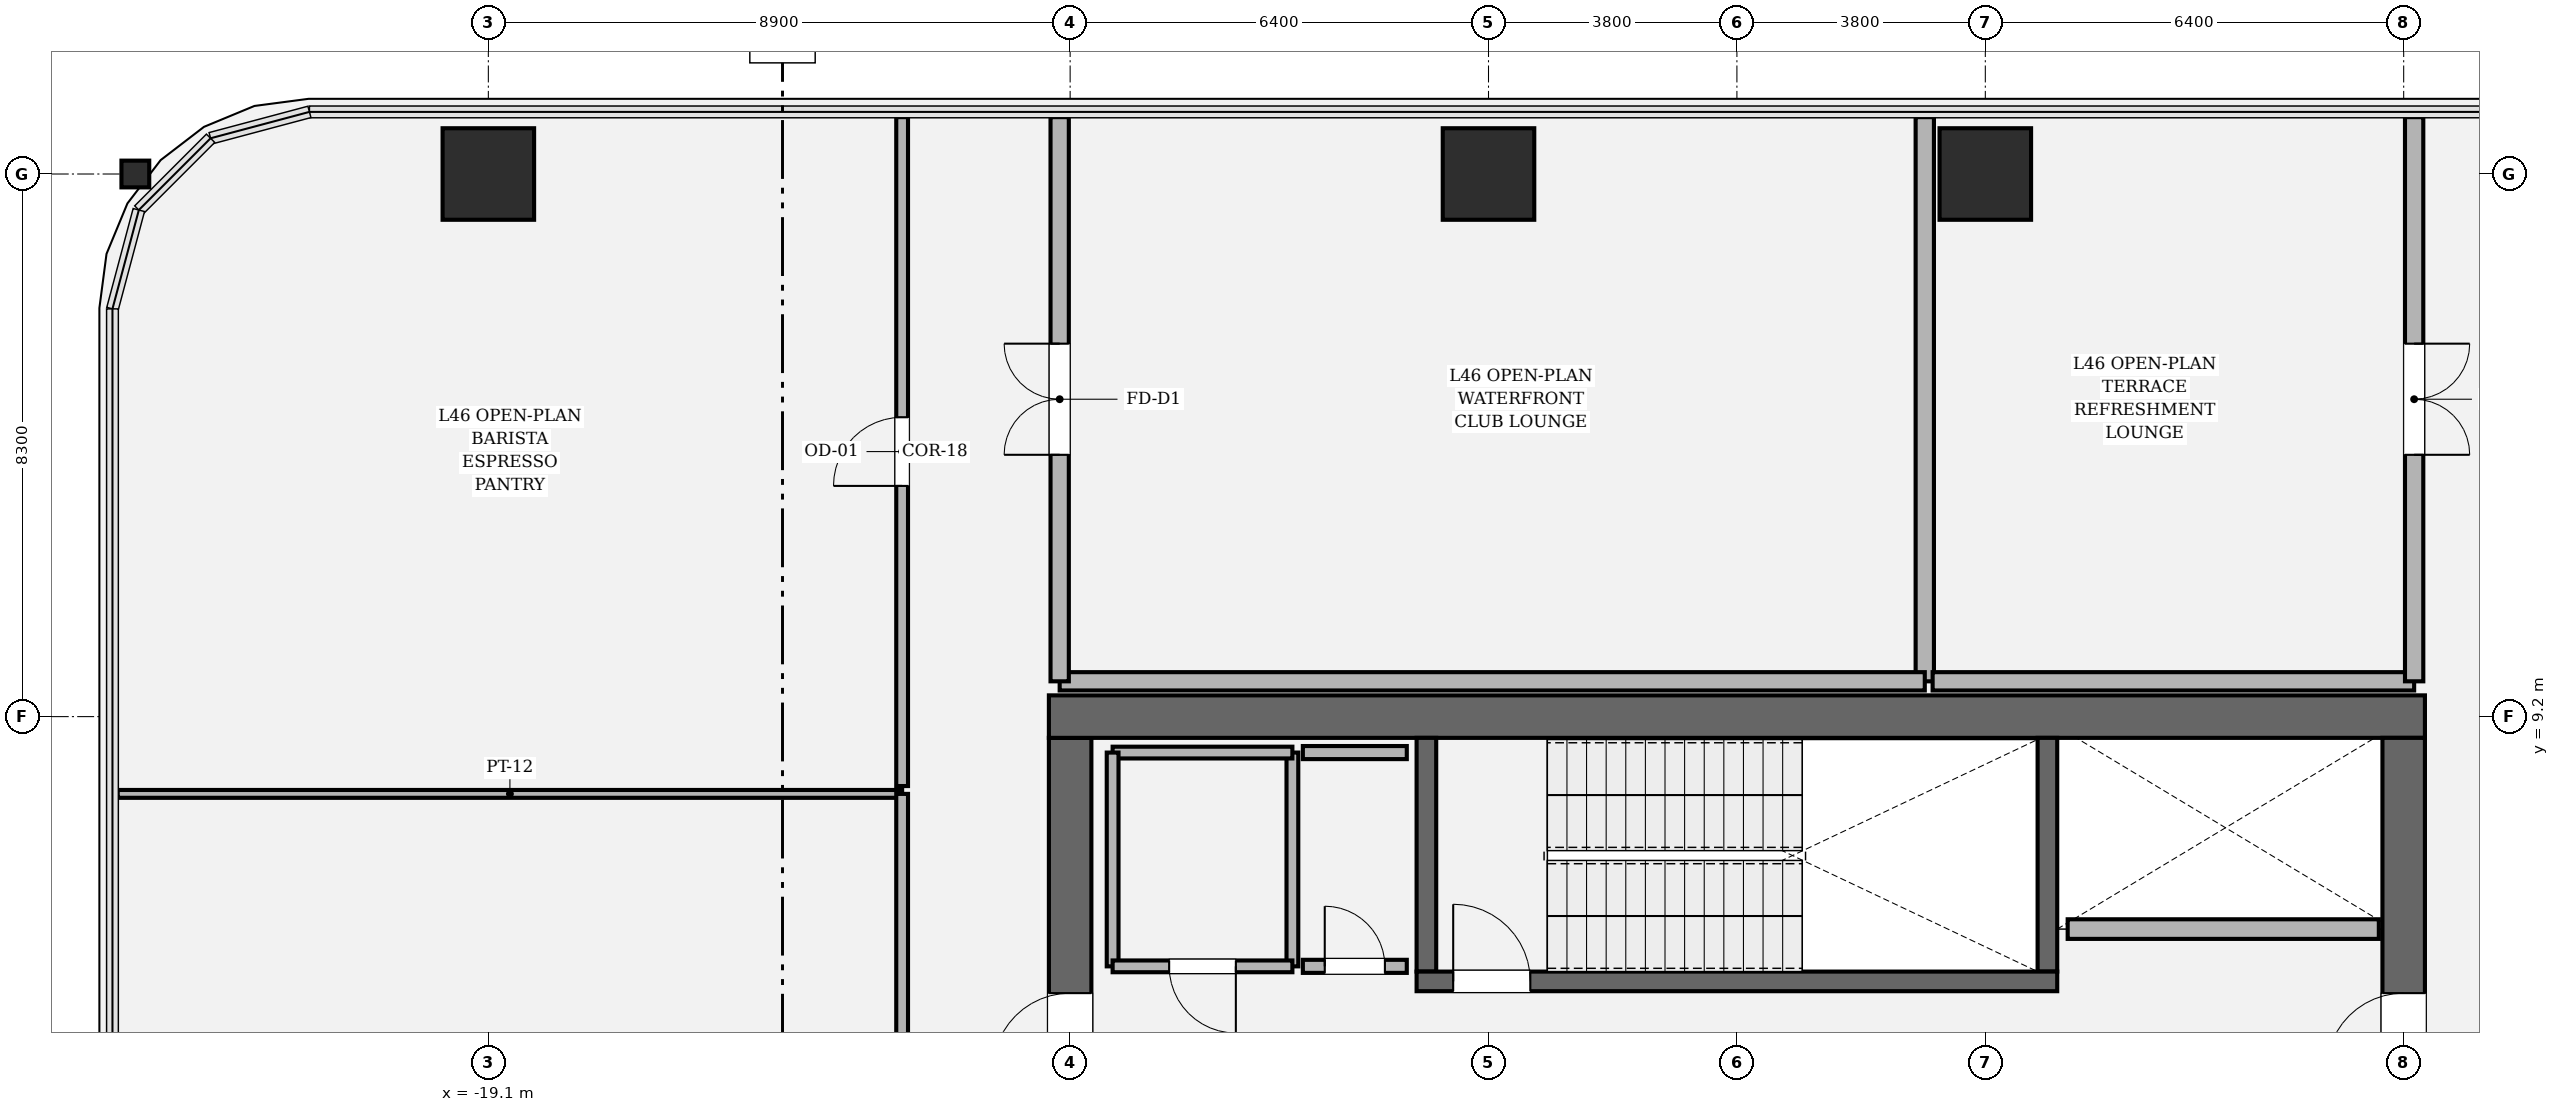
"""IFC4 building model, lengths in metres.
Left out: names, types, materials, properties, quantities, classifications, styles, units other than length and angle.
Written with IfcOpenShell. Run it as: python <this file> out.ifc"""

import sys

from ifc_helpers import new_model, si_unit, direction, frame, frame_2d, origin, origin_2d, place, context, subcontext, project, spatial, rectangle, hollow_rectangle, i_section, extrude, element, fill, save


model = new_model("IFC4")
c1 = context("Model", 3, precision=1e-05, world=origin(), true_north=direction((0.0, 1.0)))
c2 = subcontext(c1, "Body", "Model", "MODEL_VIEW")
j1 = project(units=[si_unit("LENGTHUNIT", "METRE"), si_unit("PLANEANGLEUNIT", "RADIAN")], contexts=[c1])
p1 = place(None, origin())
s1 = spatial("IfcSite", under=j1, at=p1, CompositionType="ELEMENT")
p2 = place(p1, origin())
s2 = spatial("IfcBuilding", under=s1, at=p2, CompositionType="ELEMENT")
p3 = place(p2, frame((0.0, 0.0, 196.5)))
s3 = spatial("IfcBuildingStorey", under=s2, at=p3, CompositionType="ELEMENT", Elevation=196.5)
p4 = place(p3, frame((-10.2, -8.875, 0.0), z_axis=(0.0, 0.0, 1.0), x_axis=(0.0, 1.0, 0.0)))
e1 = element("IfcWall", 1, at=p4, inside=s3, PredefinedType="SHEAR", context=c2, shape_type="SweptSolid", body=[
    extrude(rectangle(XDim=17.75, YDim=0.65, at=frame_2d((8.875, 0.0))), origin(), (0.0, 0.0, 1.0), 4.05),
])
p5 = place(p4, frame((12.665, 0.0, 0.0)))
e2 = element("IfcOpeningElement", 2, at=p5, cuts=e1, PredefinedType="OPENING", context=c2, shape_type="SweptSolid", body=[
    extrude(rectangle(XDim=1.18, YDim=2.2, at=frame_2d((0.59, 1.1))), frame((0.0, 0.335, 0.0), z_axis=(0.0, -1.0, 0.0), x_axis=(1.0, 0.0, 0.0)), (0.0, 0.0, 1.0), 0.67),
])
p6 = place(p3, frame((-10.525, 9.2, 0.0), z_axis=(0.0, 0.0, 1.0), x_axis=(1.0, 0.0, 0.0)))
e3 = element("IfcWall", 3, at=p6, inside=s3, PredefinedType="SHEAR", context=c2, shape_type="SweptSolid", body=[
    extrude(rectangle(XDim=21.05, YDim=0.65, at=frame_2d((10.525, 0.0))), origin(), (0.0, 0.0, 1.0), 4.05),
])
p7 = place(p3, frame((10.2, 8.875, 0.0), z_axis=(0.0, 0.0, 1.0), x_axis=(0.0, -1.0, 0.0)))
e4 = element("IfcWall", 4, at=p7, inside=s3, PredefinedType="SHEAR", context=c2, shape_type="SweptSolid", body=[
    extrude(rectangle(XDim=17.75, YDim=0.65, at=frame_2d((8.875, 0.0))), origin(), (0.0, 0.0, 1.0), 4.05),
])
p8 = place(p7, frame((3.905, 0.0, 0.0)))
e5 = element("IfcOpeningElement", 5, at=p8, cuts=e4, PredefinedType="OPENING", context=c2, shape_type="SweptSolid", body=[
    extrude(rectangle(XDim=1.18, YDim=2.2, at=frame_2d((0.59, 1.1))), frame((0.0, 0.335, 0.0), z_axis=(0.0, -1.0, 0.0), x_axis=(1.0, 0.0, 0.0)), (0.0, 0.0, 1.0), 0.67),
])
for number, where, z_axis, x_axis in (
    (6, (-4.75, 5.3, 0.0), (0.0, 0.0, 1.0), (0.0, 1.0, 0.0)),
    (7, (4.75, 8.875, 0.0), (0.0, 0.0, 1.0), (0.0, -1.0, 0.0)),
):
    element("IfcWall", number, at=place(p3, frame(where, z_axis=z_axis, x_axis=x_axis)), inside=s3, PredefinedType="SOLIDWALL", context=c2, shape_type="SweptSolid", body=[
        extrude(rectangle(XDim=3.575, YDim=0.3, at=frame_2d((1.788, 0.0))), origin(), (0.0, 0.0, 1.0), 4.05),
    ])
p9 = place(p3, frame((-4.9, 5.15, 0.0), z_axis=(0.0, 0.0, 1.0), x_axis=(1.0, 0.0, 0.0)))
e8 = element("IfcWall", 8, at=p9, inside=s3, PredefinedType="SOLIDWALL", context=c2, shape_type="SweptSolid", body=[
    extrude(rectangle(XDim=9.8, YDim=0.3, at=frame_2d((4.9, 0.0))), origin(), (0.0, 0.0, 1.0), 4.05),
])
p10 = place(p9, frame((0.56, 0.0, 0.0)))
e9 = element("IfcOpeningElement", 9, at=p10, cuts=e8, PredefinedType="OPENING", context=c2, shape_type="SweptSolid", body=[
    extrude(rectangle(XDim=1.18, YDim=2.2, at=frame_2d((0.59, 1.1))), frame((0.0, 0.16, 0.0), z_axis=(0.0, -1.0, 0.0), x_axis=(1.0, 0.0, 0.0)), (0.0, 0.0, 1.0), 0.32),
])
for number, where, z_axis, x_axis in (
    (10, (3.8, 17.5, 0.0), (0.0, 0.0, 1.0), (1.0, 0.0, 0.0)),
    (11, (-3.8, 17.5, 0.0), (0.0, 0.0, 1.0), (1.0, 0.0, 0.0)),
    (12, (-19.1, 17.5, 0.0), (0.0, 0.0, 1.0), (1.0, 0.0, 0.0)),
):
    element("IfcColumn", number, at=place(p3, frame(where, z_axis=z_axis, x_axis=x_axis)), inside=s3, PredefinedType="COLUMN", context=c2, shape_type="SweptSolid", body=[
        extrude(hollow_rectangle(XDim=1.4, YDim=1.4, WallThickness=0.042, at=origin_2d()), origin(), (0.0, 0.0, 1.0), 4.05),
    ])
p11 = place(p3, frame((-24.5, 17.5, 0.0), z_axis=(0.0, 0.0, 1.0), x_axis=(0.0, 1.0, 0.0)))
e13 = element("IfcColumn", 13, at=p11, inside=s3, PredefinedType="COLUMN", context=c2, shape_type="SweptSolid", body=[
    extrude(i_section(OverallWidth=0.409, OverallDepth=0.425, WebThickness=0.032, FlangeThickness=0.052, FilletRadius=0.018, at=origin_2d()), origin(), (0.0, 0.0, 1.0), 4.048),
])
p12 = place(p3, frame((5.06, 5.95, 0.0), z_axis=(0.0, 0.0, 1.0), x_axis=(1.0, 0.0, 0.0)))
e14 = element("IfcWall", 14, at=p12, inside=s3, PredefinedType="SOLIDWALL", context=c2, shape_type="SweptSolid", body=[
    extrude(rectangle(XDim=4.76, YDim=0.3, at=frame_2d((2.38, 0.0))), origin(), (0.0, 0.0, 1.0), 3.83),
])
p13 = place(p3, frame((-6.8, 5.38, 0.0), z_axis=(0.0, 0.0, 1.0), x_axis=(0.0, 1.0, 0.0)))
e15 = element("IfcWall", 15, at=p13, inside=s3, PredefinedType="PARTITIONING", context=c2, shape_type="SweptSolid", body=[
    extrude(rectangle(XDim=3.27, YDim=0.18, at=frame_2d((1.635, 0.0))), origin(), (0.0, 0.0, 1.0), 3.83),
])
p14 = place(p3, frame((-6.8, 8.65, 0.0), z_axis=(0.0, 0.0, 1.0), x_axis=(-1.0, 0.0, 0.0)))
e16 = element("IfcWall", 16, at=p14, inside=s3, PredefinedType="PARTITIONING", context=c2, shape_type="SweptSolid", body=[
    extrude(rectangle(XDim=2.75, YDim=0.18, at=frame_2d((1.375, 0.0))), origin(), (0.0, 0.0, 1.0), 3.83),
])
p15 = place(p3, frame((-9.55, 8.65, 0.0), z_axis=(0.0, 0.0, 1.0), x_axis=(0.0, -1.0, 0.0)))
e17 = element("IfcWall", 17, at=p15, inside=s3, PredefinedType="PARTITIONING", context=c2, shape_type="SweptSolid", body=[
    extrude(rectangle(XDim=3.27, YDim=0.18, at=frame_2d((1.635, 0.0))), origin(), (0.0, 0.0, 1.0), 3.83),
])
p16 = place(p3, frame((-9.55, 5.38, 0.0), z_axis=(0.0, 0.0, 1.0), x_axis=(1.0, 0.0, 0.0)))
e18 = element("IfcWall", 18, at=p16, inside=s3, PredefinedType="PARTITIONING", context=c2, shape_type="SweptSolid", body=[
    extrude(rectangle(XDim=2.75, YDim=0.18, at=frame_2d((1.375, 0.0))), origin(), (0.0, 0.0, 1.0), 3.83),
])
p17 = place(p16, frame((0.865, 0.0, 0.0)))
e19 = element("IfcOpeningElement", 19, at=p17, cuts=e18, PredefinedType="OPENING", context=c2, shape_type="SweptSolid", body=[
    extrude(rectangle(XDim=1.02, YDim=2.2, at=frame_2d((0.51, 1.1))), frame((0.0, 0.1, 0.0), z_axis=(0.0, -1.0, 0.0), x_axis=(1.0, 0.0, 0.0)), (0.0, 0.0, 1.0), 0.2),
])
p18 = place(p3, frame((-5.05, 8.65, 0.0), z_axis=(0.0, 0.0, 1.0), x_axis=(-1.0, 0.0, 0.0)))
e20 = element("IfcWall", 20, at=p18, inside=s3, PredefinedType="SOLIDWALL", context=c2, shape_type="SweptSolid", body=[
    extrude(rectangle(XDim=1.59, YDim=0.2, at=frame_2d((0.795, 0.0))), origin(), (0.0, 0.0, 1.0), 3.83),
])
p19 = place(p3, frame((-6.64, 5.38, 0.0), z_axis=(0.0, 0.0, 1.0), x_axis=(1.0, 0.0, 0.0)))
e21 = element("IfcWall", 21, at=p19, inside=s3, PredefinedType="SOLIDWALL", context=c2, shape_type="SweptSolid", body=[
    extrude(rectangle(XDim=1.59, YDim=0.2, at=frame_2d((0.795, 0.0))), origin(), (0.0, 0.0, 1.0), 3.83),
])
p20 = place(p19, frame((0.335, 0.0, 0.0)))
e22 = element("IfcOpeningElement", 22, at=p20, cuts=e21, PredefinedType="OPENING", context=c2, shape_type="SweptSolid", body=[
    extrude(rectangle(XDim=0.92, YDim=2.1, at=frame_2d((0.46, 1.05))), frame((0.0, 0.11, 0.0), z_axis=(0.0, -1.0, 0.0), x_axis=(1.0, 0.0, 0.0)), (0.0, 0.0, 1.0), 0.22),
])
p21 = place(p3, frame((-24.77, 8.018, 0.0), z_axis=(0.0, 0.0, 1.0), x_axis=(1.0, 0.0, 0.0)))
e23 = element("IfcWall", 23, at=p21, inside=s3, PredefinedType="PARTITIONING", context=c2, shape_type="SweptSolid", body=[
    extrude(rectangle(XDim=12.0, YDim=0.12, at=frame_2d((6.0, 0.0))), origin(), (0.0, 0.0, 1.0), 2.544),
])
p22 = place(p3, frame((-12.77, 8.018, 0.0), z_axis=(0.0, 0.0, 1.0), x_axis=(0.0, -1.0, 0.0)))
e24 = element("IfcWall", 24, at=p22, inside=s3, PredefinedType="PARTITIONING", context=c2, shape_type="SweptSolid", body=[
    extrude(rectangle(XDim=10.26, YDim=0.18, at=frame_2d((5.13, 0.0))), origin(), (0.0, 0.0, 1.0), 3.174),
])
p23 = place(p22, frame((4.43, 0.0, 0.0)))
e25 = element("IfcOpeningElement", 25, at=p23, cuts=e24, PredefinedType="OPENING", context=c2, shape_type="SweptSolid", body=[
    extrude(rectangle(XDim=1.4, YDim=2.25, at=frame_2d((0.7, 1.125))), frame((0.0, 0.1, 0.0), z_axis=(0.0, -1.0, 0.0), x_axis=(1.0, 0.0, 0.0)), (0.0, 0.0, 1.0), 0.2),
])
p24 = place(p3, frame((-12.77, 18.37, 0.0), z_axis=(0.0, 0.0, 1.0), x_axis=(0.0, -1.0, 0.0)))
e26 = element("IfcWall", 26, at=p24, inside=s3, PredefinedType="PARTITIONING", context=c2, shape_type="SweptSolid", body=[
    extrude(rectangle(XDim=10.232, YDim=0.18, at=frame_2d((5.116, 0.0))), origin(), (0.0, 0.0, 1.0), 3.174),
])
p25 = place(p24, frame((4.591, 0.0, 0.0)))
e27 = element("IfcOpeningElement", 27, at=p25, cuts=e26, PredefinedType="OPENING", context=c2, shape_type="SweptSolid", body=[
    extrude(rectangle(XDim=1.05, YDim=2.2, at=frame_2d((0.525, 1.1))), frame((0.0, 0.1, 0.0), z_axis=(0.0, -1.0, 0.0), x_axis=(1.0, 0.0, 0.0)), (0.0, 0.0, 1.0), 0.2),
])
p26 = place(p3, frame((2.874, 18.37, 0.0), z_axis=(0.0, 0.0, 1.0), x_axis=(0.0, -1.0, 0.0)))
e28 = element("IfcWall", 28, at=p26, inside=s3, PredefinedType="SOLIDWALL", context=c2, shape_type="SweptSolid", body=[
    extrude(rectangle(XDim=8.63, YDim=0.28, at=frame_2d((4.315, 0.0))), origin(), (0.0, 0.0, 1.0), 3.174),
])
p27 = place(p3, frame((2.874, 9.74, 0.0), z_axis=(0.0, 0.0, 1.0), x_axis=(-1.0, 0.0, 0.0)))
e29 = element("IfcWall", 29, at=p27, inside=s3, PredefinedType="SOLIDWALL", context=c2, shape_type="SweptSolid", body=[
    extrude(rectangle(XDim=13.234, YDim=0.28, at=frame_2d((6.617, 0.0))), origin(), (0.0, 0.0, 1.0), 3.174),
])
p28 = place(p3, frame((-10.36, 9.74, 0.0), z_axis=(0.0, 0.0, 1.0), x_axis=(0.0, 1.0, 0.0)))
e30 = element("IfcWall", 30, at=p28, inside=s3, PredefinedType="SOLIDWALL", context=c2, shape_type="SweptSolid", body=[
    extrude(rectangle(XDim=8.63, YDim=0.28, at=frame_2d((4.315, 0.0))), origin(), (0.0, 0.0, 1.0), 3.174),
])
p29 = place(p28, frame((3.465, 0.0, 0.0)))
e31 = element("IfcOpeningElement", 31, at=p29, cuts=e30, PredefinedType="OPENING", context=c2, shape_type="SweptSolid", body=[
    extrude(rectangle(XDim=1.7, YDim=2.3, at=frame_2d((0.85, 1.15))), frame((0.0, 0.15, 0.0), z_axis=(0.0, -1.0, 0.0), x_axis=(1.0, 0.0, 0.0)), (0.0, 0.0, 1.0), 0.3),
])
p30 = place(p3, frame((10.36, 9.74, 0.0), z_axis=(0.0, 0.0, 1.0), x_axis=(-1.0, 0.0, 0.0)))
e32 = element("IfcWall", 32, at=p30, inside=s3, PredefinedType="SOLIDWALL", context=c2, shape_type="SweptSolid", body=[
    extrude(rectangle(XDim=7.366, YDim=0.28, at=frame_2d((3.683, 0.0))), origin(), (0.0, 0.0, 1.0), 3.174),
])
p31 = place(p3, frame((10.36, 18.37, 0.0), z_axis=(0.0, 0.0, 1.0), x_axis=(0.0, -1.0, 0.0)))
e33 = element("IfcWall", 33, at=p31, inside=s3, PredefinedType="SOLIDWALL", context=c2, shape_type="SweptSolid", body=[
    extrude(rectangle(XDim=8.63, YDim=0.28, at=frame_2d((4.315, 0.0))), origin(), (0.0, 0.0, 1.0), 3.174),
])
p32 = place(p31, frame((3.465, 0.0, 0.0)))
e34 = element("IfcOpeningElement", 34, at=p32, cuts=e33, PredefinedType="OPENING", context=c2, shape_type="SweptSolid", body=[
    extrude(rectangle(XDim=1.7, YDim=2.3, at=frame_2d((0.85, 1.15))), frame((0.0, 0.15, 0.0), z_axis=(0.0, -1.0, 0.0), x_axis=(1.0, 0.0, 0.0)), (0.0, 0.0, 1.0), 0.3),
])
p33 = place(p10, origin())
e35 = element("IfcDoor", 35, at=p33, inside=s3, OperationType="SINGLE_SWING_LEFT", PredefinedType="DOOR", context=c2, shape_type="SweptSolid", body=[
    extrude(rectangle(XDim=1.18, YDim=2.2, at=frame_2d((0.59, 1.1))), frame((0.0, 0.025, 0.0), z_axis=(0.0, -1.0, 0.0), x_axis=(1.0, 0.0, 0.0)), (0.0, 0.0, 1.0), 0.05),
])
fill(e9, e35)
p34 = place(p5, origin())
e36 = element("IfcDoor", 36, at=p34, inside=s3, OperationType="SINGLE_SWING_LEFT", PredefinedType="DOOR", context=c2, shape_type="SweptSolid", body=[
    extrude(rectangle(XDim=1.18, YDim=2.2, at=frame_2d((0.59, 1.1))), frame((0.0, 0.025, 0.0), z_axis=(0.0, -1.0, 0.0), x_axis=(1.0, 0.0, 0.0)), (0.0, 0.0, 1.0), 0.05),
])
fill(e2, e36)
p35 = place(p8, origin())
e37 = element("IfcDoor", 37, at=p35, inside=s3, OperationType="SINGLE_SWING_RIGHT", PredefinedType="DOOR", context=c2, shape_type="SweptSolid", body=[
    extrude(rectangle(XDim=1.18, YDim=2.2, at=frame_2d((0.59, 1.1))), frame((0.0, 0.025, 0.0), z_axis=(0.0, -1.0, 0.0), x_axis=(1.0, 0.0, 0.0)), (0.0, 0.0, 1.0), 0.05),
])
fill(e5, e37)
p36 = place(p17, origin())
e38 = element("IfcDoor", 38, at=p36, inside=s3, OperationType="SINGLE_SWING_RIGHT", PredefinedType="DOOR", context=c2, shape_type="SweptSolid", body=[
    extrude(rectangle(XDim=1.02, YDim=2.2, at=frame_2d((0.51, 1.1))), frame((0.0, 0.025, 0.0), z_axis=(0.0, -1.0, 0.0), x_axis=(1.0, 0.0, 0.0)), (0.0, 0.0, 1.0), 0.05),
])
fill(e19, e38)
p37 = place(p20, origin())
e39 = element("IfcDoor", 39, at=p37, inside=s3, OperationType="SINGLE_SWING_LEFT", PredefinedType="DOOR", context=c2, shape_type="SweptSolid", body=[
    extrude(rectangle(XDim=0.92, YDim=2.1, at=frame_2d((0.46, 1.05))), frame((0.0, 0.025, 0.0), z_axis=(0.0, -1.0, 0.0), x_axis=(1.0, 0.0, 0.0)), (0.0, 0.0, 1.0), 0.05),
])
fill(e22, e39)
p38 = place(p25, origin())
e40 = element("IfcDoor", 40, at=p38, inside=s3, OperationType="SINGLE_SWING_RIGHT", PredefinedType="DOOR", context=c2, shape_type="SweptSolid", body=[
    extrude(rectangle(XDim=1.05, YDim=2.2, at=frame_2d((0.525, 1.1))), frame((0.0, 0.025, 0.0), z_axis=(0.0, -1.0, 0.0), x_axis=(1.0, 0.0, 0.0)), (0.0, 0.0, 1.0), 0.05),
])
fill(e27, e40)
p39 = place(p29, origin())
e41 = element("IfcDoor", 41, at=p39, inside=s3, OperationType="DOUBLE_DOOR_SINGLE_SWING", PredefinedType="DOOR", context=c2, shape_type="SweptSolid", body=[
    extrude(rectangle(XDim=1.7, YDim=2.3, at=frame_2d((0.85, 1.15))), frame((0.0, 0.025, 0.0), z_axis=(0.0, -1.0, 0.0), x_axis=(1.0, 0.0, 0.0)), (0.0, 0.0, 1.0), 0.05),
])
fill(e31, e41)
p40 = place(p32, origin())
e42 = element("IfcDoor", 42, at=p40, inside=s3, OperationType="DOUBLE_DOOR_SINGLE_SWING", PredefinedType="DOOR", context=c2, shape_type="SweptSolid", body=[
    extrude(rectangle(XDim=1.7, YDim=2.3, at=frame_2d((0.85, 1.15))), frame((0.0, 0.025, 0.0), z_axis=(0.0, -1.0, 0.0), x_axis=(1.0, 0.0, 0.0)), (0.0, 0.0, 1.0), 0.05),
])
fill(e34, e42)
save(model, sys.argv[1])
